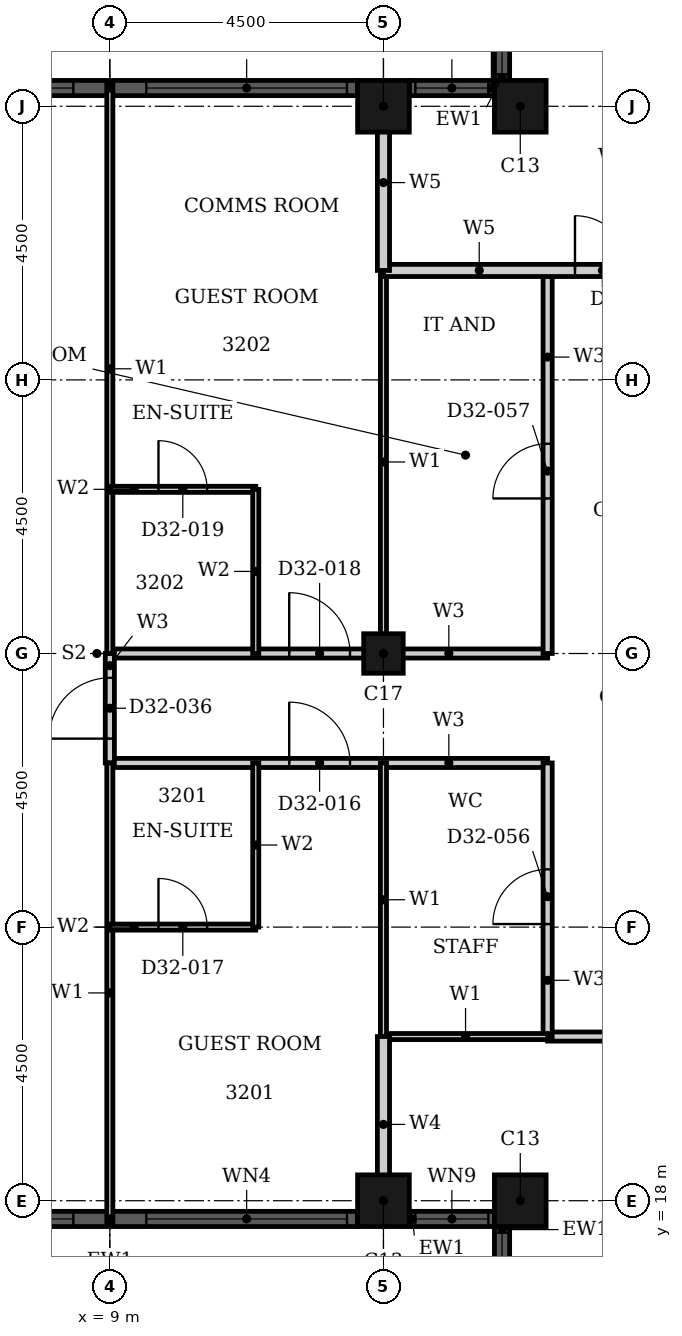
"""IFC4 building model, lengths in metres.
Left out: names, types, materials, properties, quantities, classifications, styles, units other than length and angle.
Written with IfcOpenShell. Run it as: python <this file> out.ifc"""

import sys

from ifc_helpers import new_model, si_unit, direction, frame, frame_2d, origin, origin_2d, place, context, subcontext, project, spatial, rectangle, hollow_rectangle, extrude, element, fill, save


model = new_model("IFC4")
c1 = context("Model", 3, precision=1e-05, world=origin(), true_north=direction((0.0, 1.0)))
c2 = subcontext(c1, "Body", "Model", "MODEL_VIEW")
j1 = project(units=[si_unit("LENGTHUNIT", "METRE"), si_unit("PLANEANGLEUNIT", "RADIAN")], contexts=[c1])
p1 = place(None, origin())
s1 = spatial("IfcSite", under=j1, at=p1, CompositionType="ELEMENT")
p2 = place(p1, origin())
s2 = spatial("IfcBuilding", under=s1, at=p2, CompositionType="ELEMENT")
p3 = place(p2, frame((0.0, 0.0, 129.6)))
s3 = spatial("IfcBuildingStorey", under=s2, at=p3, CompositionType="ELEMENT", Elevation=129.6)
for number, where, z_axis, x_axis in (
    (1, (15.75, 36.0, 0.0), (0.0, 0.0, 1.0), (1.0, 0.0, 0.0)),
    (2, (13.5, 36.0, 0.0), (0.0, 0.0, 1.0), (1.0, 0.0, 0.0)),
    (3, (13.5, 18.0, 0.0), (0.0, 0.0, 1.0), (1.0, 0.0, 0.0)),
    (4, (15.75, 18.0, 0.0), (0.0, 0.0, 1.0), (1.0, 0.0, 0.0)),
):
    element("IfcColumn", number, at=place(p3, frame(where, z_axis=z_axis, x_axis=x_axis)), inside=s3, PredefinedType="COLUMN", context=c2, shape_type="SweptSolid", body=[
        extrude(hollow_rectangle(XDim=0.85, YDim=0.85, WallThickness=0.026, at=origin_2d()), origin(), (0.0, 0.0, 1.0), 3.6),
    ])
p4 = place(p3, frame((13.5, 27.0, 0.0), z_axis=(0.0, 0.0, 1.0), x_axis=(1.0, 0.0, 0.0)))
e5 = element("IfcColumn", 5, at=p4, inside=s3, PredefinedType="COLUMN", context=c2, shape_type="SweptSolid", body=[
    extrude(hollow_rectangle(XDim=0.65, YDim=0.65, WallThickness=0.021, at=origin_2d()), origin(), (0.0, 0.0, 1.0), 3.6),
])
p5 = place(p3, frame((15.45, 37.825, 0.0), z_axis=(0.0, 0.0, 1.0), x_axis=(0.0, -1.0, 0.0)))
e6 = element("IfcWall", 6, at=p5, inside=s3, PredefinedType="SOLIDWALL", context=c2, shape_type="SweptSolid", body=[
    extrude(rectangle(XDim=1.4, YDim=0.25, at=frame_2d((0.7, 0.0))), origin(), (0.0, 0.0, 1.0), 3.6),
])
p6 = place(p5, frame((0.1, 0.0, 0.9)))
e7 = element("IfcOpeningElement", 7, at=p6, cuts=e6, PredefinedType="OPENING", context=c2, shape_type="SweptSolid", body=[
    extrude(rectangle(XDim=1.2, YDim=2.08, at=frame_2d((0.6, 1.04))), frame((0.0, 0.135, 0.0), z_axis=(0.0, -1.0, 0.0), x_axis=(1.0, 0.0, 0.0)), (0.0, 0.0, 1.0), 0.27),
])
p7 = place(p3, frame((15.325, 36.3, 0.0), z_axis=(0.0, 0.0, 1.0), x_axis=(-1.0, 0.0, 0.0)))
e8 = element("IfcWall", 8, at=p7, inside=s3, PredefinedType="SOLIDWALL", context=c2, shape_type="SweptSolid", body=[
    extrude(rectangle(XDim=1.4, YDim=0.25, at=frame_2d((0.7, 0.0))), origin(), (0.0, 0.0, 1.0), 3.6),
])
p8 = place(p7, frame((0.1, 0.0, 0.9)))
e9 = element("IfcOpeningElement", 9, at=p8, cuts=e8, PredefinedType="OPENING", context=c2, shape_type="SweptSolid", body=[
    extrude(rectangle(XDim=1.2, YDim=2.08, at=frame_2d((0.6, 1.04))), frame((0.0, 0.135, 0.0), z_axis=(0.0, -1.0, 0.0), x_axis=(1.0, 0.0, 0.0)), (0.0, 0.0, 1.0), 0.27),
])
p9 = place(p3, frame((13.075, 36.3, 0.0), z_axis=(0.0, 0.0, 1.0), x_axis=(-1.0, 0.0, 0.0)))
e10 = element("IfcWall", 10, at=p9, inside=s3, PredefinedType="SOLIDWALL", context=c2, shape_type="SweptSolid", body=[
    extrude(rectangle(XDim=8.15, YDim=0.25, at=frame_2d((4.075, 0.0))), origin(), (0.0, 0.0, 1.0), 3.6),
])
p10 = place(p9, frame((0.175, 0.0, 0.9)))
e11 = element("IfcOpeningElement", 11, at=p10, cuts=e10, PredefinedType="OPENING", context=c2, shape_type="SweptSolid", body=[
    extrude(rectangle(XDim=3.3, YDim=2.08, at=frame_2d((1.65, 1.04))), frame((0.0, 0.135, 0.0), z_axis=(0.0, -1.0, 0.0), x_axis=(1.0, 0.0, 0.0)), (0.0, 0.0, 1.0), 0.27),
])
p11 = place(p9, frame((4.675, 0.0, 0.9)))
e12 = element("IfcOpeningElement", 12, at=p11, cuts=e10, PredefinedType="OPENING", context=c2, shape_type="SweptSolid", body=[
    extrude(rectangle(XDim=3.3, YDim=2.08, at=frame_2d((1.65, 1.04))), frame((0.0, 0.135, 0.0), z_axis=(0.0, -1.0, 0.0), x_axis=(1.0, 0.0, 0.0)), (0.0, 0.0, 1.0), 0.27),
])
p12 = place(p3, frame((4.925, 17.7, 0.0), z_axis=(0.0, 0.0, 1.0), x_axis=(1.0, 0.0, 0.0)))
e13 = element("IfcWall", 13, at=p12, inside=s3, PredefinedType="SOLIDWALL", context=c2, shape_type="SweptSolid", body=[
    extrude(rectangle(XDim=8.15, YDim=0.25, at=frame_2d((4.075, 0.0))), origin(), (0.0, 0.0, 1.0), 3.6),
])
p13 = place(p12, frame((0.175, 0.0, 0.9)))
e14 = element("IfcOpeningElement", 14, at=p13, cuts=e13, PredefinedType="OPENING", context=c2, shape_type="SweptSolid", body=[
    extrude(rectangle(XDim=3.3, YDim=2.08, at=frame_2d((1.65, 1.04))), frame((0.0, 0.135, 0.0), z_axis=(0.0, -1.0, 0.0), x_axis=(1.0, 0.0, 0.0)), (0.0, 0.0, 1.0), 0.27),
])
p14 = place(p12, frame((4.675, 0.0, 0.9)))
e15 = element("IfcOpeningElement", 15, at=p14, cuts=e13, PredefinedType="OPENING", context=c2, shape_type="SweptSolid", body=[
    extrude(rectangle(XDim=3.3, YDim=2.08, at=frame_2d((1.65, 1.04))), frame((0.0, 0.135, 0.0), z_axis=(0.0, -1.0, 0.0), x_axis=(1.0, 0.0, 0.0)), (0.0, 0.0, 1.0), 0.27),
])
p15 = place(p3, frame((13.925, 17.7, 0.0), z_axis=(0.0, 0.0, 1.0), x_axis=(1.0, 0.0, 0.0)))
e16 = element("IfcWall", 16, at=p15, inside=s3, PredefinedType="SOLIDWALL", context=c2, shape_type="SweptSolid", body=[
    extrude(rectangle(XDim=1.4, YDim=0.25, at=frame_2d((0.7, 0.0))), origin(), (0.0, 0.0, 1.0), 3.6),
])
p16 = place(p15, frame((0.1, 0.0, 0.9)))
e17 = element("IfcOpeningElement", 17, at=p16, cuts=e16, PredefinedType="OPENING", context=c2, shape_type="SweptSolid", body=[
    extrude(rectangle(XDim=1.2, YDim=2.08, at=frame_2d((0.6, 1.04))), frame((0.0, 0.135, 0.0), z_axis=(0.0, -1.0, 0.0), x_axis=(1.0, 0.0, 0.0)), (0.0, 0.0, 1.0), 0.27),
])
p17 = place(p3, frame((15.45, 17.575, 0.0), z_axis=(0.0, 0.0, 1.0), x_axis=(0.0, -1.0, 0.0)))
e18 = element("IfcWall", 18, at=p17, inside=s3, PredefinedType="SOLIDWALL", context=c2, shape_type="SweptSolid", body=[
    extrude(rectangle(XDim=1.4, YDim=0.25, at=frame_2d((0.7, 0.0))), origin(), (0.0, 0.0, 1.0), 3.6),
])
p18 = place(p17, frame((0.1, 0.0, 0.9)))
e19 = element("IfcOpeningElement", 19, at=p18, cuts=e18, PredefinedType="OPENING", context=c2, shape_type="SweptSolid", body=[
    extrude(rectangle(XDim=1.2, YDim=2.08, at=frame_2d((0.6, 1.04))), frame((0.0, 0.135, 0.0), z_axis=(0.0, -1.0, 0.0), x_axis=(1.0, 0.0, 0.0)), (0.0, 0.0, 1.0), 0.27),
])
p19 = place(p3, frame((16.2, 20.7, 0.0), z_axis=(0.0, 0.0, 1.0), x_axis=(1.0, 0.0, 0.0)))
e20 = element("IfcWall", 20, at=p19, inside=s3, PredefinedType="PARTITIONING", context=c2, shape_type="SweptSolid", body=[
    extrude(rectangle(XDim=13.5, YDim=0.15, at=frame_2d((6.75, 0.0))), origin(), (0.0, 0.0, 1.0), 3.3),
])
p20 = place(p19, frame((4.75, 0.0, 0.0)))
e21 = element("IfcOpeningElement", 21, at=p20, cuts=e20, PredefinedType="OPENING", context=c2, shape_type="SweptSolid", body=[
    extrude(rectangle(XDim=1.0, YDim=2.1, at=frame_2d((0.5, 1.05))), frame((0.0, 0.085, 0.0), z_axis=(0.0, -1.0, 0.0), x_axis=(1.0, 0.0, 0.0)), (0.0, 0.0, 1.0), 0.17),
])
p21 = place(p19, frame((9.45, 0.0, 0.0)))
e22 = element("IfcOpeningElement", 22, at=p21, cuts=e20, PredefinedType="OPENING", context=c2, shape_type="SweptSolid", body=[
    extrude(rectangle(XDim=0.9, YDim=2.1, at=frame_2d((0.45, 1.05))), frame((0.0, 0.085, 0.0), z_axis=(0.0, -1.0, 0.0), x_axis=(1.0, 0.0, 0.0)), (0.0, 0.0, 1.0), 0.17),
])
p22 = place(p3, frame((9.0, 25.2, 0.0), z_axis=(0.0, 0.0, 1.0), x_axis=(1.0, 0.0, 0.0)))
e23 = element("IfcWall", 23, at=p22, inside=s3, PredefinedType="PARTITIONING", context=c2, shape_type="SweptSolid", body=[
    extrude(rectangle(XDim=7.2, YDim=0.15, at=frame_2d((3.6, 0.0))), origin(), (0.0, 0.0, 1.0), 3.3),
])
p23 = place(p22, frame((2.95, 0.0, 0.0)))
e24 = element("IfcOpeningElement", 24, at=p23, cuts=e23, PredefinedType="OPENING", context=c2, shape_type="SweptSolid", body=[
    extrude(rectangle(XDim=1.0, YDim=2.1, at=frame_2d((0.5, 1.05))), frame((0.0, 0.085, 0.0), z_axis=(0.0, -1.0, 0.0), x_axis=(1.0, 0.0, 0.0)), (0.0, 0.0, 1.0), 0.17),
])
p24 = place(p3, frame((9.0, 27.0, 0.0), z_axis=(0.0, 0.0, 1.0), x_axis=(1.0, 0.0, 0.0)))
e25 = element("IfcWall", 25, at=p24, inside=s3, PredefinedType="PARTITIONING", context=c2, shape_type="SweptSolid", body=[
    extrude(rectangle(XDim=7.2, YDim=0.15, at=frame_2d((3.6, 0.0))), origin(), (0.0, 0.0, 1.0), 2.58),
])
p25 = place(p24, frame((2.95, 0.0, 0.0)))
e26 = element("IfcOpeningElement", 26, at=p25, cuts=e25, PredefinedType="OPENING", context=c2, shape_type="SweptSolid", body=[
    extrude(rectangle(XDim=1.0, YDim=2.1, at=frame_2d((0.5, 1.05))), frame((0.0, 0.085, 0.0), z_axis=(0.0, -1.0, 0.0), x_axis=(1.0, 0.0, 0.0)), (0.0, 0.0, 1.0), 0.17),
])
p26 = place(p3, frame((16.2, 27.0, 0.0), z_axis=(0.0, 0.0, 1.0), x_axis=(0.0, 1.0, 0.0)))
e27 = element("IfcWall", 27, at=p26, inside=s3, PredefinedType="PARTITIONING", context=c2, shape_type="SweptSolid", body=[
    extrude(rectangle(XDim=6.3, YDim=0.15, at=frame_2d((3.15, 0.0))), origin(), (0.0, 0.0, 1.0), 3.3),
])
p27 = place(p26, frame((2.55, 0.0, 0.0)))
e28 = element("IfcOpeningElement", 28, at=p27, cuts=e27, PredefinedType="OPENING", context=c2, shape_type="SweptSolid", body=[
    extrude(rectangle(XDim=0.9, YDim=2.1, at=frame_2d((0.45, 1.05))), frame((0.0, 0.085, 0.0), z_axis=(0.0, -1.0, 0.0), x_axis=(1.0, 0.0, 0.0)), (0.0, 0.0, 1.0), 0.17),
])
p28 = place(p3, frame((16.2, 20.7, 0.0), z_axis=(0.0, 0.0, 1.0), x_axis=(0.0, 1.0, 0.0)))
e29 = element("IfcWall", 29, at=p28, inside=s3, PredefinedType="PARTITIONING", context=c2, shape_type="SweptSolid", body=[
    extrude(rectangle(XDim=4.5, YDim=0.15, at=frame_2d((2.25, 0.0))), origin(), (0.0, 0.0, 1.0), 3.3),
])
p29 = place(p28, frame((1.85, 0.0, 0.0)))
e30 = element("IfcOpeningElement", 30, at=p29, cuts=e29, PredefinedType="OPENING", context=c2, shape_type="SweptSolid", body=[
    extrude(rectangle(XDim=0.9, YDim=2.1, at=frame_2d((0.45, 1.05))), frame((0.0, 0.085, 0.0), z_axis=(0.0, -1.0, 0.0), x_axis=(1.0, 0.0, 0.0)), (0.0, 0.0, 1.0), 0.17),
])
p30 = place(p3, frame((9.0, 25.2, 0.0), z_axis=(0.0, 0.0, 1.0), x_axis=(0.0, 1.0, 0.0)))
e31 = element("IfcWall", 31, at=p30, inside=s3, PredefinedType="PARTITIONING", context=c2, shape_type="SweptSolid", body=[
    extrude(rectangle(XDim=1.8, YDim=0.15, at=frame_2d((0.9, 0.0))), origin(), (0.0, 0.0, 1.0), 3.3),
])
p31 = place(p30, frame((0.4, 0.0, 0.0)))
e32 = element("IfcOpeningElement", 32, at=p31, cuts=e31, PredefinedType="OPENING", context=c2, shape_type="SweptSolid", body=[
    extrude(rectangle(XDim=1.0, YDim=2.1, at=frame_2d((0.5, 1.05))), frame((0.0, 0.085, 0.0), z_axis=(0.0, -1.0, 0.0), x_axis=(1.0, 0.0, 0.0)), (0.0, 0.0, 1.0), 0.17),
])
p32 = place(p3, frame((13.5, 20.7, 0.0), z_axis=(0.0, 0.0, 1.0), x_axis=(1.0, 0.0, 0.0)))
e33 = element("IfcWall", 33, at=p32, inside=s3, PredefinedType="PARTITIONING", context=c2, shape_type="SweptSolid", body=[
    extrude(rectangle(XDim=2.7, YDim=0.1, at=frame_2d((1.35, 0.0))), origin(), (0.0, 0.0, 1.0), 3.3),
])
p33 = place(p3, frame((13.5, 27.0, 0.0), z_axis=(0.0, 0.0, 1.0), x_axis=(0.0, 1.0, 0.0)))
e34 = element("IfcWall", 34, at=p33, inside=s3, PredefinedType="PARTITIONING", context=c2, shape_type="SweptSolid", body=[
    extrude(rectangle(XDim=6.3, YDim=0.1, at=frame_2d((3.15, 0.0))), origin(), (0.0, 0.0, 1.0), 2.38),
])
p34 = place(p3, frame((13.5, 20.7, 0.0), z_axis=(0.0, 0.0, 1.0), x_axis=(0.0, 1.0, 0.0)))
e35 = element("IfcWall", 35, at=p34, inside=s3, PredefinedType="PARTITIONING", context=c2, shape_type="SweptSolid", body=[
    extrude(rectangle(XDim=4.5, YDim=0.1, at=frame_2d((2.25, 0.0))), origin(), (0.0, 0.0, 1.0), 2.38),
])
p35 = place(p3, frame((9.0, 27.0, 0.0), z_axis=(0.0, 0.0, 1.0), x_axis=(0.0, 1.0, 0.0)))
e36 = element("IfcWall", 36, at=p35, inside=s3, PredefinedType="PARTITIONING", context=c2, shape_type="SweptSolid", body=[
    extrude(rectangle(XDim=9.365, YDim=0.1, at=frame_2d((4.683, 0.0))), origin(), (0.0, 0.0, 1.0), 3.3),
])
p36 = place(p3, frame((9.0, 17.635, 0.0), z_axis=(0.0, 0.0, 1.0), x_axis=(0.0, 1.0, 0.0)))
e37 = element("IfcWall", 37, at=p36, inside=s3, PredefinedType="PARTITIONING", context=c2, shape_type="SweptSolid", body=[
    extrude(rectangle(XDim=7.565, YDim=0.1, at=frame_2d((3.782, 0.0))), origin(), (0.0, 0.0, 1.0), 3.3),
])
p37 = place(p3, frame((13.5, 17.81, 0.0), z_axis=(0.0, 0.0, 1.0), x_axis=(0.0, 1.0, 0.0)))
e38 = element("IfcWall", 38, at=p37, inside=s3, PredefinedType="PARTITIONING", context=c2, shape_type="SweptSolid", body=[
    extrude(rectangle(XDim=2.89, YDim=0.2, at=frame_2d((1.445, 0.0))), origin(), (0.0, 0.0, 1.0), 2.38),
])
p38 = place(p3, frame((9.0, 22.5, 0.0), z_axis=(0.0, 0.0, 1.0), x_axis=(1.0, 0.0, 0.0)))
e39 = element("IfcWall", 39, at=p38, inside=s3, PredefinedType="PARTITIONING", context=c2, shape_type="SweptSolid", body=[
    extrude(rectangle(XDim=2.4, YDim=0.1, at=frame_2d((1.2, 0.0))), origin(), (0.0, 0.0, 1.0), 2.58),
])
p39 = place(p38, frame((0.8, 0.0, 0.0)))
e40 = element("IfcOpeningElement", 40, at=p39, cuts=e39, PredefinedType="OPENING", context=c2, shape_type="SweptSolid", body=[
    extrude(rectangle(XDim=0.8, YDim=2.1, at=frame_2d((0.4, 1.05))), frame((0.0, 0.06, 0.0), z_axis=(0.0, -1.0, 0.0), x_axis=(1.0, 0.0, 0.0)), (0.0, 0.0, 1.0), 0.12),
])
p40 = place(p3, frame((9.0, 29.7, 0.0), z_axis=(0.0, 0.0, 1.0), x_axis=(1.0, 0.0, 0.0)))
e41 = element("IfcWall", 41, at=p40, inside=s3, PredefinedType="PARTITIONING", context=c2, shape_type="SweptSolid", body=[
    extrude(rectangle(XDim=2.4, YDim=0.1, at=frame_2d((1.2, 0.0))), origin(), (0.0, 0.0, 1.0), 3.3),
])
p41 = place(p40, frame((0.8, 0.0, 0.0)))
e42 = element("IfcOpeningElement", 42, at=p41, cuts=e41, PredefinedType="OPENING", context=c2, shape_type="SweptSolid", body=[
    extrude(rectangle(XDim=0.8, YDim=2.1, at=frame_2d((0.4, 1.05))), frame((0.0, 0.06, 0.0), z_axis=(0.0, -1.0, 0.0), x_axis=(1.0, 0.0, 0.0)), (0.0, 0.0, 1.0), 0.12),
])
for number, where, z_axis, x_axis in (
    (43, (11.4, 27.0, 0.0), (0.0, 0.0, 1.0), (0.0, 1.0, 0.0)),
    (44, (11.4, 22.5, 0.0), (0.0, 0.0, 1.0), (0.0, 1.0, 0.0)),
):
    element("IfcWall", number, at=place(p3, frame(where, z_axis=z_axis, x_axis=x_axis)), inside=s3, PredefinedType="PARTITIONING", context=c2, shape_type="SweptSolid", body=[
        extrude(rectangle(XDim=2.7, YDim=0.1, at=frame_2d((1.35, 0.0))), origin(), (0.0, 0.0, 1.0), 3.3),
    ])
p42 = place(p3, frame((13.5, 33.3, 0.0), z_axis=(0.0, 0.0, 1.0), x_axis=(1.0, 0.0, 0.0)))
e45 = element("IfcWall", 45, at=p42, inside=s3, PredefinedType="PARTITIONING", context=c2, shape_type="SweptSolid", body=[
    extrude(rectangle(XDim=4.5, YDim=0.2, at=frame_2d((2.25, 0.0))), origin(), (0.0, 0.0, 1.0), 3.3),
])
p43 = place(p42, frame((3.15, 0.0, 0.0)))
e46 = element("IfcOpeningElement", 46, at=p43, cuts=e45, PredefinedType="OPENING", context=c2, shape_type="SweptSolid", body=[
    extrude(rectangle(XDim=0.9, YDim=2.1, at=frame_2d((0.45, 1.05))), frame((0.0, 0.11, 0.0), z_axis=(0.0, -1.0, 0.0), x_axis=(1.0, 0.0, 0.0)), (0.0, 0.0, 1.0), 0.22),
])
p44 = place(p3, frame((13.5, 33.3, 0.0), z_axis=(0.0, 0.0, 1.0), x_axis=(0.0, 1.0, 0.0)))
e47 = element("IfcWall", 47, at=p44, inside=s3, PredefinedType="PARTITIONING", context=c2, shape_type="SweptSolid", body=[
    extrude(rectangle(XDim=2.89, YDim=0.2, at=frame_2d((1.445, 0.0))), origin(), (0.0, 0.0, 1.0), 2.38),
])
p45 = place(p6, origin())
e48 = element("IfcWindow", 48, at=p45, inside=s3, PartitioningType="SINGLE_PANEL", PredefinedType="WINDOW", context=c2, shape_type="SweptSolid", body=[
    extrude(rectangle(XDim=1.2, YDim=2.08, at=frame_2d((0.6, 1.04))), frame((0.0, 0.03, 0.0), z_axis=(0.0, -1.0, 0.0), x_axis=(1.0, 0.0, 0.0)), (0.0, 0.0, 1.0), 0.06),
])
fill(e7, e48)
p46 = place(p8, origin())
e49 = element("IfcWindow", 49, at=p46, inside=s3, PartitioningType="SINGLE_PANEL", PredefinedType="WINDOW", context=c2, shape_type="SweptSolid", body=[
    extrude(rectangle(XDim=1.2, YDim=2.08, at=frame_2d((0.6, 1.04))), frame((0.0, 0.03, 0.0), z_axis=(0.0, -1.0, 0.0), x_axis=(1.0, 0.0, 0.0)), (0.0, 0.0, 1.0), 0.06),
])
fill(e9, e49)
p47 = place(p10, origin())
e50 = element("IfcWindow", 50, at=p47, inside=s3, PartitioningType="SINGLE_PANEL", PredefinedType="WINDOW", context=c2, shape_type="SweptSolid", body=[
    extrude(rectangle(XDim=3.3, YDim=2.08, at=frame_2d((1.65, 1.04))), frame((0.0, 0.03, 0.0), z_axis=(0.0, -1.0, 0.0), x_axis=(1.0, 0.0, 0.0)), (0.0, 0.0, 1.0), 0.06),
])
fill(e11, e50)
p48 = place(p11, origin())
e51 = element("IfcWindow", 51, at=p48, inside=s3, PartitioningType="SINGLE_PANEL", PredefinedType="WINDOW", context=c2, shape_type="SweptSolid", body=[
    extrude(rectangle(XDim=3.3, YDim=2.08, at=frame_2d((1.65, 1.04))), frame((0.0, 0.03, 0.0), z_axis=(0.0, -1.0, 0.0), x_axis=(1.0, 0.0, 0.0)), (0.0, 0.0, 1.0), 0.06),
])
fill(e12, e51)
p49 = place(p13, origin())
e52 = element("IfcWindow", 52, at=p49, inside=s3, PartitioningType="SINGLE_PANEL", PredefinedType="WINDOW", context=c2, shape_type="SweptSolid", body=[
    extrude(rectangle(XDim=3.3, YDim=2.08, at=frame_2d((1.65, 1.04))), frame((0.0, 0.03, 0.0), z_axis=(0.0, -1.0, 0.0), x_axis=(1.0, 0.0, 0.0)), (0.0, 0.0, 1.0), 0.06),
])
fill(e14, e52)
p50 = place(p14, origin())
e53 = element("IfcWindow", 53, at=p50, inside=s3, PartitioningType="SINGLE_PANEL", PredefinedType="WINDOW", context=c2, shape_type="SweptSolid", body=[
    extrude(rectangle(XDim=3.3, YDim=2.08, at=frame_2d((1.65, 1.04))), frame((0.0, 0.03, 0.0), z_axis=(0.0, -1.0, 0.0), x_axis=(1.0, 0.0, 0.0)), (0.0, 0.0, 1.0), 0.06),
])
fill(e15, e53)
p51 = place(p16, origin())
e54 = element("IfcWindow", 54, at=p51, inside=s3, PartitioningType="SINGLE_PANEL", PredefinedType="WINDOW", context=c2, shape_type="SweptSolid", body=[
    extrude(rectangle(XDim=1.2, YDim=2.08, at=frame_2d((0.6, 1.04))), frame((0.0, 0.03, 0.0), z_axis=(0.0, -1.0, 0.0), x_axis=(1.0, 0.0, 0.0)), (0.0, 0.0, 1.0), 0.06),
])
fill(e17, e54)
p52 = place(p18, origin())
e55 = element("IfcWindow", 55, at=p52, inside=s3, PartitioningType="SINGLE_PANEL", PredefinedType="WINDOW", context=c2, shape_type="SweptSolid", body=[
    extrude(rectangle(XDim=1.2, YDim=2.08, at=frame_2d((0.6, 1.04))), frame((0.0, 0.03, 0.0), z_axis=(0.0, -1.0, 0.0), x_axis=(1.0, 0.0, 0.0)), (0.0, 0.0, 1.0), 0.06),
])
fill(e19, e55)
p53 = place(p23, origin())
e56 = element("IfcDoor", 56, at=p53, inside=s3, OperationType="SINGLE_SWING_RIGHT", PredefinedType="DOOR", context=c2, shape_type="SweptSolid", body=[
    extrude(rectangle(XDim=1.0, YDim=2.1, at=frame_2d((0.5, 1.05))), frame((0.0, 0.025, 0.0), z_axis=(0.0, -1.0, 0.0), x_axis=(1.0, 0.0, 0.0)), (0.0, 0.0, 1.0), 0.05),
])
fill(e24, e56)
p54 = place(p39, origin())
e57 = element("IfcDoor", 57, at=p54, inside=s3, OperationType="SINGLE_SWING_LEFT", PredefinedType="DOOR", context=c2, shape_type="SweptSolid", body=[
    extrude(rectangle(XDim=0.8, YDim=2.1, at=frame_2d((0.4, 1.05))), frame((0.0, 0.025, 0.0), z_axis=(0.0, -1.0, 0.0), x_axis=(1.0, 0.0, 0.0)), (0.0, 0.0, 1.0), 0.05),
])
fill(e40, e57)
p55 = place(p25, origin())
e58 = element("IfcDoor", 58, at=p55, inside=s3, OperationType="SINGLE_SWING_RIGHT", PredefinedType="DOOR", context=c2, shape_type="SweptSolid", body=[
    extrude(rectangle(XDim=1.0, YDim=2.1, at=frame_2d((0.5, 1.05))), frame((0.0, 0.025, 0.0), z_axis=(0.0, -1.0, 0.0), x_axis=(1.0, 0.0, 0.0)), (0.0, 0.0, 1.0), 0.05),
])
fill(e26, e58)
p56 = place(p41, origin())
e59 = element("IfcDoor", 59, at=p56, inside=s3, OperationType="SINGLE_SWING_LEFT", PredefinedType="DOOR", context=c2, shape_type="SweptSolid", body=[
    extrude(rectangle(XDim=0.8, YDim=2.1, at=frame_2d((0.4, 1.05))), frame((0.0, 0.025, 0.0), z_axis=(0.0, -1.0, 0.0), x_axis=(1.0, 0.0, 0.0)), (0.0, 0.0, 1.0), 0.05),
])
fill(e42, e59)
p57 = place(p31, origin())
e60 = element("IfcDoor", 60, at=p57, inside=s3, OperationType="SINGLE_SWING_RIGHT", PredefinedType="DOOR", context=c2, shape_type="SweptSolid", body=[
    extrude(rectangle(XDim=1.0, YDim=2.1, at=frame_2d((0.5, 1.05))), frame((0.0, 0.025, 0.0), z_axis=(0.0, -1.0, 0.0), x_axis=(1.0, 0.0, 0.0)), (0.0, 0.0, 1.0), 0.05),
])
fill(e32, e60)
p58 = place(p43, origin())
e61 = element("IfcDoor", 61, at=p58, inside=s3, OperationType="SINGLE_SWING_LEFT", PredefinedType="DOOR", context=c2, shape_type="SweptSolid", body=[
    extrude(rectangle(XDim=0.9, YDim=2.1, at=frame_2d((0.45, 1.05))), frame((0.0, 0.025, 0.0), z_axis=(0.0, -1.0, 0.0), x_axis=(1.0, 0.0, 0.0)), (0.0, 0.0, 1.0), 0.05),
])
fill(e46, e61)
p59 = place(p29, origin())
e62 = element("IfcDoor", 62, at=p59, inside=s3, OperationType="SINGLE_SWING_LEFT", PredefinedType="DOOR", context=c2, shape_type="SweptSolid", body=[
    extrude(rectangle(XDim=0.9, YDim=2.1, at=frame_2d((0.45, 1.05))), frame((0.0, 0.025, 0.0), z_axis=(0.0, -1.0, 0.0), x_axis=(1.0, 0.0, 0.0)), (0.0, 0.0, 1.0), 0.05),
])
fill(e30, e62)
p60 = place(p27, origin())
e63 = element("IfcDoor", 63, at=p60, inside=s3, OperationType="SINGLE_SWING_LEFT", PredefinedType="DOOR", context=c2, shape_type="SweptSolid", body=[
    extrude(rectangle(XDim=0.9, YDim=2.1, at=frame_2d((0.45, 1.05))), frame((0.0, 0.025, 0.0), z_axis=(0.0, -1.0, 0.0), x_axis=(1.0, 0.0, 0.0)), (0.0, 0.0, 1.0), 0.05),
])
fill(e28, e63)
save(model, sys.argv[1])
